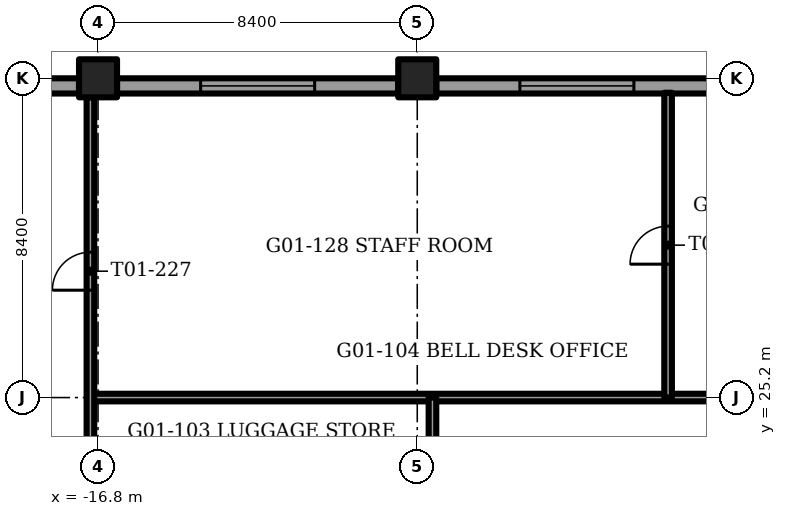
"""IFC4 building model, lengths in metres.
Left out: names, types, materials, properties, quantities, classifications, styles, units other than length and angle.
Written with IfcOpenShell. Run it as: python <this file> out.ifc"""

import sys

from ifc_helpers import new_model, si_unit, direction, frame, frame_2d, origin, origin_2d, place, context, subcontext, project, spatial, rectangle, extrude, element, fill, save


model = new_model("IFC4")
c1 = context("Model", 3, precision=1e-05, world=origin(), true_north=direction((0.0, 1.0)))
c2 = subcontext(c1, "Body", "Model", "MODEL_VIEW")
j1 = project(units=[si_unit("LENGTHUNIT", "METRE"), si_unit("PLANEANGLEUNIT", "RADIAN")], contexts=[c1])
p1 = place(None, origin())
s1 = spatial("IfcSite", under=j1, at=p1, CompositionType="ELEMENT")
p2 = place(p1, origin())
s2 = spatial("IfcBuilding", under=s1, at=p2, CompositionType="ELEMENT")
p3 = place(p2, frame((0.0, 0.0, 6.0)))
s3 = spatial("IfcBuildingStorey", under=s2, at=p3, CompositionType="ELEMENT", Elevation=6.0)
for number, where, z_axis, x_axis in (
    (1, (-16.8, 33.6, -0.35), (0.0, 0.0, 1.0), (1.0, 0.0, 0.0)),
    (2, (-8.4, 33.6, -0.35), (0.0, 0.0, 1.0), (1.0, 0.0, 0.0)),
):
    element("IfcColumn", number, at=place(p3, frame(where, z_axis=z_axis, x_axis=x_axis)), inside=s3, PredefinedType="COLUMN", context=c2, shape_type="SweptSolid", body=[
        extrude(rectangle(XDim=1.0, YDim=1.0, at=origin_2d()), origin(), (0.0, 0.0, 1.0), 4.0),
    ])
p4 = place(p3, frame((-24.7, 33.4, 0.0), z_axis=(0.0, 0.0, 1.0), x_axis=(1.0, 0.0, 0.0)))
e3 = element("IfcWall", 3, at=p4, inside=s3, PredefinedType="SOLIDWALL", context=c2, shape_type="SweptSolid", body=[
    extrude(rectangle(XDim=7.4, YDim=0.4, at=frame_2d((3.7, 0.0))), origin(), (0.0, 0.0, 1.0), 3.65),
])
p5 = place(p4, frame((2.2, 0.0, 1.0)))
e4 = element("IfcOpeningElement", 4, at=p5, cuts=e3, PredefinedType="OPENING", context=c2, shape_type="SweptSolid", body=[
    extrude(rectangle(XDim=3.0, YDim=2.2, at=frame_2d((1.5, 1.1))), frame((0.0, 0.2, 0.0), z_axis=(0.0, -1.0, 0.0), x_axis=(1.0, 0.0, 0.0)), (0.0, 0.0, 1.0), 0.4),
])
p6 = place(p3, frame((-16.3, 33.4, 0.0), z_axis=(0.0, 0.0, 1.0), x_axis=(1.0, 0.0, 0.0)))
e5 = element("IfcWall", 5, at=p6, inside=s3, PredefinedType="SOLIDWALL", context=c2, shape_type="SweptSolid", body=[
    extrude(rectangle(XDim=7.4, YDim=0.4, at=frame_2d((3.7, 0.0))), origin(), (0.0, 0.0, 1.0), 3.65),
])
p7 = place(p6, frame((2.2, 0.0, 1.0)))
e6 = element("IfcOpeningElement", 6, at=p7, cuts=e5, PredefinedType="OPENING", context=c2, shape_type="SweptSolid", body=[
    extrude(rectangle(XDim=3.0, YDim=2.2, at=frame_2d((1.5, 1.1))), frame((0.0, 0.2, 0.0), z_axis=(0.0, -1.0, 0.0), x_axis=(1.0, 0.0, 0.0)), (0.0, 0.0, 1.0), 0.4),
])
p8 = place(p3, frame((-7.9, 33.4, 0.0), z_axis=(0.0, 0.0, 1.0), x_axis=(1.0, 0.0, 0.0)))
e7 = element("IfcWall", 7, at=p8, inside=s3, PredefinedType="SOLIDWALL", context=c2, shape_type="SweptSolid", body=[
    extrude(rectangle(XDim=7.4, YDim=0.4, at=frame_2d((3.7, 0.0))), origin(), (0.0, 0.0, 1.0), 3.65),
])
p9 = place(p8, frame((2.2, 0.0, 1.0)))
e8 = element("IfcOpeningElement", 8, at=p9, cuts=e7, PredefinedType="OPENING", context=c2, shape_type="SweptSolid", body=[
    extrude(rectangle(XDim=3.0, YDim=2.2, at=frame_2d((1.5, 1.1))), frame((0.0, 0.2, 0.0), z_axis=(0.0, -1.0, 0.0), x_axis=(1.0, 0.0, 0.0)), (0.0, 0.0, 1.0), 0.4),
])
p10 = place(p3, frame((-17.0, 25.2, 0.0), z_axis=(0.0, 0.0, 1.0), x_axis=(1.0, 0.0, 0.0)))
e9 = element("IfcWall", 9, at=p10, inside=s3, PredefinedType="PARTITIONING", context=c2, shape_type="SweptSolid", body=[
    extrude(rectangle(XDim=28.019, YDim=0.2, at=frame_2d((14.01, 0.0))), origin(), (0.0, 0.0, 1.0), 3.65),
])
p11 = place(p10, frame((26.209, 0.0, 0.0)))
e10 = element("IfcOpeningElement", 10, at=p11, cuts=e9, PredefinedType="OPENING", context=c2, shape_type="SweptSolid", body=[
    extrude(rectangle(XDim=1.0, YDim=2.1, at=frame_2d((0.5, 1.05))), frame((0.0, 0.1, 0.0), z_axis=(0.0, -1.0, 0.0), x_axis=(1.0, 0.0, 0.0)), (0.0, 0.0, 1.0), 0.2),
])
p12 = place(p3, frame((-17.0, 22.2, 0.0), z_axis=(0.0, 0.0, 1.0), x_axis=(0.0, 1.0, 0.0)))
e11 = element("IfcWall", 11, at=p12, inside=s3, PredefinedType="PARTITIONING", context=c2, shape_type="SweptSolid", body=[
    extrude(rectangle(XDim=10.9, YDim=0.2, at=frame_2d((5.45, 0.0))), origin(), (0.0, 0.0, 1.0), 3.65),
])
p13 = place(p12, frame((5.825, 0.0, 0.0)))
e12 = element("IfcOpeningElement", 12, at=p13, cuts=e11, PredefinedType="OPENING", context=c2, shape_type="SweptSolid", body=[
    extrude(rectangle(XDim=1.0, YDim=2.1, at=frame_2d((0.5, 1.05))), frame((0.0, 0.1, 0.0), z_axis=(0.0, -1.0, 0.0), x_axis=(1.0, 0.0, 0.0)), (0.0, 0.0, 1.0), 0.2),
])
p14 = place(p3, frame((-8.0, 22.2, 0.0), z_axis=(0.0, 0.0, 1.0), x_axis=(0.0, 1.0, 0.0)))
e13 = element("IfcWall", 13, at=p14, inside=s3, PredefinedType="PARTITIONING", context=c2, shape_type="SweptSolid", body=[
    extrude(rectangle(XDim=3.0, YDim=0.2, at=frame_2d((1.5, 0.0))), origin(), (0.0, 0.0, 1.0), 3.65),
])
p15 = place(p3, frame((-1.8, 25.2, 0.0), z_axis=(0.0, 0.0, 1.0), x_axis=(0.0, 1.0, 0.0)))
e14 = element("IfcWall", 14, at=p15, inside=s3, PredefinedType="PARTITIONING", context=c2, shape_type="SweptSolid", body=[
    extrude(rectangle(XDim=8.02, YDim=0.2, at=frame_2d((4.01, 0.0))), origin(), (0.0, 0.0, 1.0), 3.65),
])
p16 = place(p15, frame((3.51, 0.0, 0.0)))
e15 = element("IfcOpeningElement", 15, at=p16, cuts=e14, PredefinedType="OPENING", context=c2, shape_type="SweptSolid", body=[
    extrude(rectangle(XDim=1.0, YDim=2.1, at=frame_2d((0.5, 1.05))), frame((0.0, 0.1, 0.0), z_axis=(0.0, -1.0, 0.0), x_axis=(1.0, 0.0, 0.0)), (0.0, 0.0, 1.0), 0.2),
])
p17 = place(p7, origin())
e16 = element("IfcWindow", 16, at=p17, inside=s3, PartitioningType="SINGLE_PANEL", PredefinedType="WINDOW", context=c2, shape_type="SweptSolid", body=[
    extrude(rectangle(XDim=3.0, YDim=2.2, at=frame_2d((1.5, 1.1))), frame((0.0, 0.03, 0.0), z_axis=(0.0, -1.0, 0.0), x_axis=(1.0, 0.0, 0.0)), (0.0, 0.0, 1.0), 0.06),
])
fill(e6, e16)
p18 = place(p9, origin())
e17 = element("IfcWindow", 17, at=p18, inside=s3, PartitioningType="SINGLE_PANEL", PredefinedType="WINDOW", context=c2, shape_type="SweptSolid", body=[
    extrude(rectangle(XDim=3.0, YDim=2.2, at=frame_2d((1.5, 1.1))), frame((0.0, 0.03, 0.0), z_axis=(0.0, -1.0, 0.0), x_axis=(1.0, 0.0, 0.0)), (0.0, 0.0, 1.0), 0.06),
])
fill(e8, e17)
p19 = place(p13, origin())
e18 = element("IfcDoor", 18, at=p19, inside=s3, OperationType="SINGLE_SWING_LEFT", PredefinedType="DOOR", context=c2, shape_type="SweptSolid", body=[
    extrude(rectangle(XDim=1.0, YDim=2.1, at=frame_2d((0.5, 1.05))), frame((0.0, 0.025, 0.0), z_axis=(0.0, -1.0, 0.0), x_axis=(1.0, 0.0, 0.0)), (0.0, 0.0, 1.0), 0.05),
])
fill(e12, e18)
p20 = place(p16, origin())
e19 = element("IfcDoor", 19, at=p20, inside=s3, OperationType="SINGLE_SWING_RIGHT", PredefinedType="DOOR", context=c2, shape_type="SweptSolid", body=[
    extrude(rectangle(XDim=1.0, YDim=2.1, at=frame_2d((0.5, 1.05))), frame((0.0, 0.025, 0.0), z_axis=(0.0, -1.0, 0.0), x_axis=(1.0, 0.0, 0.0)), (0.0, 0.0, 1.0), 0.05),
])
fill(e15, e19)
save(model, sys.argv[1])
